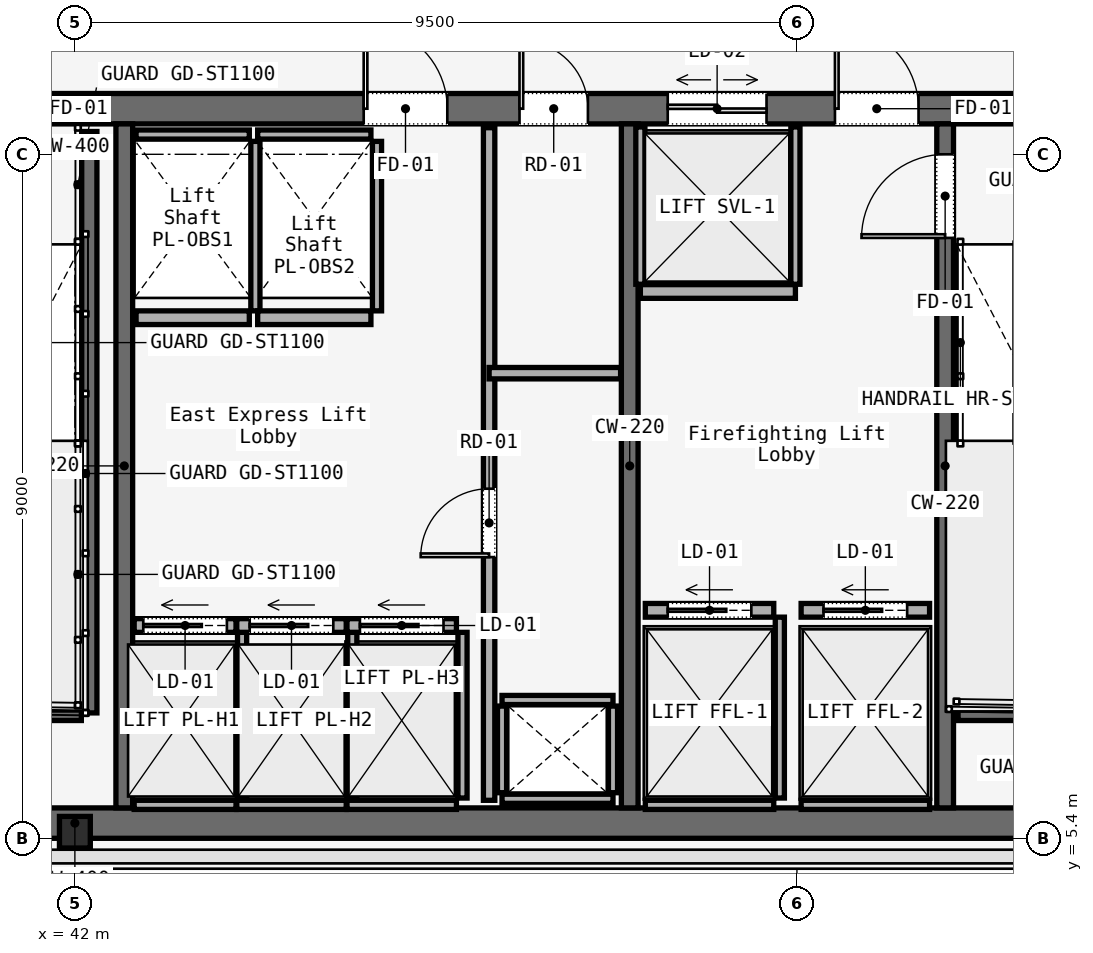
"""IFC4 building model, lengths in metres.
Left out: names, types, materials, properties, quantities, classifications, styles, units other than length and angle.
Written with IfcOpenShell. Run it as: python <this file> out.ifc"""

import sys

from ifc_helpers import new_model, si_unit, direction, frame, frame_2d, origin, origin_2d, place, context, subcontext, project, spatial, rectangle, i_section, extrude, element, fill, save


model = new_model("IFC4")
c1 = context("Model", 3, precision=1e-05, world=origin(), true_north=direction((0.0, 1.0)))
c2 = subcontext(c1, "Body", "Model", "MODEL_VIEW")
j1 = project(units=[si_unit("LENGTHUNIT", "METRE"), si_unit("PLANEANGLEUNIT", "RADIAN")], contexts=[c1])
p1 = place(None, origin())
s1 = spatial("IfcSite", under=j1, at=p1, CompositionType="ELEMENT")
p2 = place(p1, origin())
s2 = spatial("IfcBuilding", under=s1, at=p2, CompositionType="ELEMENT")
p3 = place(p2, frame((0.0, 0.0, 263.6)))
s3 = spatial("IfcBuildingStorey", under=s2, at=p3, CompositionType="ELEMENT", Elevation=263.6)
p4 = place(p3, frame((26.45, 15.0, 0.0), z_axis=(0.0, 0.0, 1.0), x_axis=(1.0, 0.0, 0.0)))
e1 = element("IfcWall", 1, at=p4, inside=s3, PredefinedType="SOLIDWALL", context=c2, shape_type="SweptSolid", body=[
    extrude(rectangle(XDim=31.1, YDim=0.4, at=frame_2d((15.55, 0.0))), origin(), (0.0, 0.0, 1.0), 3.58),
])
p5 = place(p4, frame((1.65, 0.0, 0.0)))
e2 = element("IfcOpeningElement", 2, at=p5, cuts=e1, PredefinedType="OPENING", context=c2, shape_type="SweptSolid", body=[
    extrude(rectangle(XDim=1.1, YDim=2.2, at=frame_2d((0.55, 1.1))), frame((0.0, 0.2, 0.0), z_axis=(0.0, -1.0, 0.0), x_axis=(1.0, 0.0, 0.0)), (0.0, 0.0, 1.0), 0.4),
])
p6 = place(p4, frame((13.65, 0.0, 0.0)))
e3 = element("IfcOpeningElement", 3, at=p6, cuts=e1, PredefinedType="OPENING", context=c2, shape_type="SweptSolid", body=[
    extrude(rectangle(XDim=1.1, YDim=2.2, at=frame_2d((0.55, 1.1))), frame((0.0, 0.2, 0.0), z_axis=(0.0, -1.0, 0.0), x_axis=(1.0, 0.0, 0.0)), (0.0, 0.0, 1.0), 0.4),
])
p7 = place(p4, frame((25.55, 0.0, 0.0)))
e4 = element("IfcOpeningElement", 4, at=p7, cuts=e1, PredefinedType="OPENING", context=c2, shape_type="SweptSolid", body=[
    extrude(rectangle(XDim=1.1, YDim=2.2, at=frame_2d((0.55, 1.1))), frame((0.0, 0.2, 0.0), z_axis=(0.0, -1.0, 0.0), x_axis=(1.0, 0.0, 0.0)), (0.0, 0.0, 1.0), 0.4),
])
p8 = place(p4, frame((19.35, 0.0, 0.0)))
e5 = element("IfcOpeningElement", 5, at=p8, cuts=e1, PredefinedType="OPENING", context=c2, shape_type="SweptSolid", body=[
    extrude(rectangle(XDim=1.1, YDim=2.2, at=frame_2d((0.55, 1.1))), frame((0.0, 0.2, 0.0), z_axis=(0.0, -1.0, 0.0), x_axis=(1.0, 0.0, 0.0)), (0.0, 0.0, 1.0), 0.4),
])
p9 = place(p4, frame((21.4, 0.0, 0.0)))
e6 = element("IfcOpeningElement", 6, at=p9, cuts=e1, PredefinedType="OPENING", context=c2, shape_type="SweptSolid", body=[
    extrude(rectangle(XDim=0.9, YDim=2.1, at=frame_2d((0.45, 1.05))), frame((0.0, 0.2, 0.0), z_axis=(0.0, -1.0, 0.0), x_axis=(1.0, 0.0, 0.0)), (0.0, 0.0, 1.0), 0.4),
])
p10 = place(p4, frame((5.14, 0.0, 0.0)))
e7 = element("IfcOpeningElement", 7, at=p10, cuts=e1, PredefinedType="OPENING", context=c2, shape_type="SweptSolid", body=[
    extrude(rectangle(XDim=0.95, YDim=2.2, at=frame_2d((0.475, 1.1))), frame((0.0, 0.2, 0.0), z_axis=(0.0, -1.0, 0.0), x_axis=(1.0, 0.0, 0.0)), (0.0, 0.0, 1.0), 0.4),
])
p11 = place(p4, frame((7.825, 0.0, 0.0)))
e8 = element("IfcOpeningElement", 8, at=p11, cuts=e1, PredefinedType="OPENING", context=c2, shape_type="SweptSolid", body=[
    extrude(rectangle(XDim=0.95, YDim=2.2, at=frame_2d((0.475, 1.1))), frame((0.0, 0.2, 0.0), z_axis=(0.0, -1.0, 0.0), x_axis=(1.0, 0.0, 0.0)), (0.0, 0.0, 1.0), 0.4),
])
p12 = place(p4, frame((10.46, 0.0, 0.0)))
e9 = element("IfcOpeningElement", 9, at=p12, cuts=e1, PredefinedType="OPENING", context=c2, shape_type="SweptSolid", body=[
    extrude(rectangle(XDim=0.95, YDim=2.2, at=frame_2d((0.475, 1.1))), frame((0.0, 0.2, 0.0), z_axis=(0.0, -1.0, 0.0), x_axis=(1.0, 0.0, 0.0)), (0.0, 0.0, 1.0), 0.4),
])
p13 = place(p4, frame((23.35, 0.0, 0.0)))
e10 = element("IfcOpeningElement", 10, at=p13, cuts=e1, PredefinedType="OPENING", context=c2, shape_type="SweptSolid", body=[
    extrude(rectangle(XDim=1.3, YDim=2.3, at=frame_2d((0.65, 1.15))), frame((0.0, 0.2, 0.0), z_axis=(0.0, -1.0, 0.0), x_axis=(1.0, 0.0, 0.0)), (0.0, 0.0, 1.0), 0.4),
])
p14 = place(p3, frame((26.45, 5.6, 0.0), z_axis=(0.0, 0.0, 1.0), x_axis=(1.0, 0.0, 0.0)))
e11 = element("IfcWall", 11, at=p14, inside=s3, PredefinedType="SOLIDWALL", context=c2, shape_type="SweptSolid", body=[
    extrude(rectangle(XDim=31.1, YDim=0.4, at=frame_2d((15.55, 0.0))), origin(), (0.0, 0.0, 1.0), 3.58),
])
for number, where, z_axis, x_axis in (
    (12, (42.65, 5.8, 0.0), (0.0, 0.0, 1.0), (0.0, 1.0, 0.0)),
    (13, (49.3, 5.8, 0.0), (0.0, 0.0, 1.0), (0.0, 1.0, 0.0)),
):
    element("IfcWall", number, at=place(p3, frame(where, z_axis=z_axis, x_axis=x_axis)), inside=s3, PredefinedType="SOLIDWALL", context=c2, shape_type="SweptSolid", body=[
        extrude(rectangle(XDim=9.0, YDim=0.22, at=frame_2d((4.5, 0.0))), origin(), (0.0, 0.0, 1.0), 3.58),
    ])
p15 = place(p3, frame((53.45, 5.8, 0.0), z_axis=(0.0, 0.0, 1.0), x_axis=(0.0, 1.0, 0.0)))
e14 = element("IfcWall", 14, at=p15, inside=s3, PredefinedType="SOLIDWALL", context=c2, shape_type="SweptSolid", body=[
    extrude(rectangle(XDim=9.0, YDim=0.22, at=frame_2d((4.5, 0.0))), origin(), (0.0, 0.0, 1.0), 3.58),
])
p16 = place(p15, frame((7.5, 0.0, 0.0)))
e15 = element("IfcOpeningElement", 15, at=p16, cuts=e14, PredefinedType="OPENING", context=c2, shape_type="SweptSolid", body=[
    extrude(rectangle(XDim=1.1, YDim=2.2, at=frame_2d((0.55, 1.1))), frame((0.0, 0.11, 0.0), z_axis=(0.0, -1.0, 0.0), x_axis=(1.0, 0.0, 0.0)), (0.0, 0.0, 1.0), 0.22),
])
p17 = place(p3, frame((42.0, 5.48, 0.0), z_axis=(0.0, 0.0, 1.0), x_axis=(1.0, 0.0, 0.0)))
e16 = element("IfcColumn", 16, at=p17, inside=s3, PredefinedType="COLUMN", context=c2, shape_type="SweptSolid", body=[
    extrude(i_section(OverallWidth=0.406, OverallDepth=0.416, WebThickness=0.03, FlangeThickness=0.037, FilletRadius=0.015, at=origin_2d()), origin(), (0.0, 0.0, 1.0), 3.58),
])
p18 = place(p3, frame((42.19, 14.7, 0.0), z_axis=(0.0, 0.0, 1.0), x_axis=(0.0, -1.0, 0.0)))
e17 = element("IfcWall", 17, at=p18, inside=s3, PredefinedType="SOLIDWALL", context=c2, shape_type="SweptSolid", body=[
    extrude(rectangle(XDim=7.65, YDim=0.2, at=frame_2d((3.825, 0.0))), origin(), (0.0, 0.0, 1.0), 3.8),
])
for number, where, z_axis, x_axis in (
    (18, (38.97, 7.05, 0.0), (0.0, 0.0, 1.0), (1.0, 0.0, 0.0)),
    (19, (53.62, 7.05, 0.0), (0.0, 0.0, 1.0), (1.0, 0.0, 0.0)),
):
    element("IfcWall", number, at=place(p3, frame(where, z_axis=z_axis, x_axis=x_axis)), inside=s3, PredefinedType="SOLIDWALL", context=c2, shape_type="SweptSolid", body=[
        extrude(rectangle(XDim=3.115, YDim=0.2, at=frame_2d((1.558, 0.0))), origin(), (0.0, 0.0, 1.0), 3.8),
    ])
for number, where, z_axis, x_axis in (
    (20, (47.62, 5.92, 0.0), (0.0, 0.0, 1.0), (1.0, 0.0, 0.0)),
    (21, (47.62, 7.22, 0.0), (0.0, 0.0, 1.0), (1.0, 0.0, 0.0)),
):
    element("IfcWall", number, at=place(p3, frame(where, z_axis=z_axis, x_axis=x_axis)), inside=s3, PredefinedType="SOLIDWALL", context=c2, shape_type="SweptSolid", body=[
        extrude(rectangle(XDim=1.46, YDim=0.12, at=frame_2d((0.73, 0.0))), origin(), (0.0, 0.0, 1.0), 3.01),
    ])
for number, where, z_axis, x_axis in (
    (22, (47.62, 6.0, 0.0), (0.0, 0.0, 1.0), (0.0, 1.0, 0.0)),
    (23, (49.08, 6.0, 0.0), (0.0, 0.0, 1.0), (0.0, 1.0, 0.0)),
):
    element("IfcWall", number, at=place(p3, frame(where, z_axis=z_axis, x_axis=x_axis)), inside=s3, PredefinedType="SOLIDWALL", context=c2, shape_type="SweptSolid", body=[
        extrude(rectangle(XDim=1.14, YDim=0.12, at=frame_2d((0.57, 0.0))), origin(), (0.0, 0.0, 1.0), 3.01),
    ])
p19 = place(p3, frame((47.45, 5.9, 0.0), z_axis=(0.0, 0.0, 1.0), x_axis=(0.0, 1.0, 0.0)))
e24 = element("IfcWall", 24, at=p19, inside=s3, PredefinedType="PARTITIONING", context=c2, shape_type="SweptSolid", body=[
    extrude(rectangle(XDim=8.85, YDim=0.15, at=frame_2d((4.425, 0.0))), origin(), (0.0, 0.0, 1.0), 3.01),
])
p20 = place(p19, frame((3.2, 0.0, 0.0)))
e25 = element("IfcOpeningElement", 25, at=p20, cuts=e24, PredefinedType="OPENING", context=c2, shape_type="SweptSolid", body=[
    extrude(rectangle(XDim=0.9, YDim=2.1, at=frame_2d((0.45, 1.05))), frame((0.0, 0.075, 0.0), z_axis=(0.0, -1.0, 0.0), x_axis=(1.0, 0.0, 0.0)), (0.0, 0.0, 1.0), 0.15),
])
p21 = place(p3, frame((47.45, 11.52, 0.0), z_axis=(0.0, 0.0, 1.0), x_axis=(1.0, 0.0, 0.0)))
e26 = element("IfcWall", 26, at=p21, inside=s3, PredefinedType="PARTITIONING", context=c2, shape_type="SweptSolid", body=[
    extrude(rectangle(XDim=1.73, YDim=0.15, at=frame_2d((0.865, 0.0))), origin(), (0.0, 0.0, 1.0), 3.01),
])
p22 = place(p3, frame((42.78, 8.2, 0.0), z_axis=(0.0, 0.0, 1.0), x_axis=(1.0, 0.0, 0.0)))
e27 = element("IfcWall", 27, at=p22, inside=s3, PredefinedType="SOLIDWALL", context=c2, shape_type="SweptSolid", body=[
    extrude(rectangle(XDim=1.34, YDim=0.18, at=frame_2d((0.67, 0.0))), origin(), (0.0, 0.0, 1.0), 3.01),
])
p23 = place(p22, frame((0.12, 0.0, 0.0)))
e28 = element("IfcOpeningElement", 28, at=p23, cuts=e27, PredefinedType="OPENING", context=c2, shape_type="SweptSolid", body=[
    extrude(rectangle(XDim=1.1, YDim=2.2, at=frame_2d((0.55, 1.1))), frame((0.0, 0.09, 0.0), z_axis=(0.0, -1.0, 0.0), x_axis=(1.0, 0.0, 0.0)), (0.0, 0.0, 1.0), 0.18),
])
p24 = place(p3, frame((42.78, 5.84, 0.0), z_axis=(0.0, 0.0, 1.0), x_axis=(1.0, 0.0, 0.0)))
e29 = element("IfcWall", 29, at=p24, inside=s3, PredefinedType="SOLIDWALL", context=c2, shape_type="SweptSolid", body=[
    extrude(rectangle(XDim=1.34, YDim=0.12, at=frame_2d((0.67, 0.0))), origin(), (0.0, 0.0, 1.0), 3.01),
])
p25 = place(p3, frame((44.2, 5.93, 0.0), z_axis=(0.0, 0.0, 1.0), x_axis=(0.0, 1.0, 0.0)))
e30 = element("IfcWall", 30, at=p25, inside=s3, PredefinedType="SOLIDWALL", context=c2, shape_type="SweptSolid", body=[
    extrude(rectangle(XDim=2.18, YDim=0.12, at=frame_2d((1.09, 0.0))), origin(), (0.0, 0.0, 1.0), 3.01),
])
p26 = place(p3, frame((44.13, 8.2, 0.0), z_axis=(0.0, 0.0, 1.0), x_axis=(1.0, 0.0, 0.0)))
e31 = element("IfcWall", 31, at=p26, inside=s3, PredefinedType="SOLIDWALL", context=c2, shape_type="SweptSolid", body=[
    extrude(rectangle(XDim=1.44, YDim=0.18, at=frame_2d((0.72, 0.0))), origin(), (0.0, 0.0, 1.0), 3.01),
])
p27 = place(p26, frame((0.17, 0.0, 0.0)))
e32 = element("IfcOpeningElement", 32, at=p27, cuts=e31, PredefinedType="OPENING", context=c2, shape_type="SweptSolid", body=[
    extrude(rectangle(XDim=1.1, YDim=2.2, at=frame_2d((0.55, 1.1))), frame((0.0, 0.09, 0.0), z_axis=(0.0, -1.0, 0.0), x_axis=(1.0, 0.0, 0.0)), (0.0, 0.0, 1.0), 0.18),
])
p28 = place(p3, frame((44.13, 5.84, 0.0), z_axis=(0.0, 0.0, 1.0), x_axis=(1.0, 0.0, 0.0)))
e33 = element("IfcWall", 33, at=p28, inside=s3, PredefinedType="SOLIDWALL", context=c2, shape_type="SweptSolid", body=[
    extrude(rectangle(XDim=1.44, YDim=0.12, at=frame_2d((0.72, 0.0))), origin(), (0.0, 0.0, 1.0), 3.01),
])
p29 = place(p3, frame((45.65, 5.93, 0.0), z_axis=(0.0, 0.0, 1.0), x_axis=(0.0, 1.0, 0.0)))
e34 = element("IfcWall", 34, at=p29, inside=s3, PredefinedType="SOLIDWALL", context=c2, shape_type="SweptSolid", body=[
    extrude(rectangle(XDim=2.18, YDim=0.12, at=frame_2d((1.09, 0.0))), origin(), (0.0, 0.0, 1.0), 3.01),
])
p30 = place(p3, frame((45.58, 8.2, 0.0), z_axis=(0.0, 0.0, 1.0), x_axis=(1.0, 0.0, 0.0)))
e35 = element("IfcWall", 35, at=p30, inside=s3, PredefinedType="SOLIDWALL", context=c2, shape_type="SweptSolid", body=[
    extrude(rectangle(XDim=1.44, YDim=0.18, at=frame_2d((0.72, 0.0))), origin(), (0.0, 0.0, 1.0), 3.01),
])
p31 = place(p30, frame((0.17, 0.0, 0.0)))
e36 = element("IfcOpeningElement", 36, at=p31, cuts=e35, PredefinedType="OPENING", context=c2, shape_type="SweptSolid", body=[
    extrude(rectangle(XDim=1.1, YDim=2.2, at=frame_2d((0.55, 1.1))), frame((0.0, 0.09, 0.0), z_axis=(0.0, -1.0, 0.0), x_axis=(1.0, 0.0, 0.0)), (0.0, 0.0, 1.0), 0.18),
])
p32 = place(p3, frame((45.58, 5.84, 0.0), z_axis=(0.0, 0.0, 1.0), x_axis=(1.0, 0.0, 0.0)))
e37 = element("IfcWall", 37, at=p32, inside=s3, PredefinedType="SOLIDWALL", context=c2, shape_type="SweptSolid", body=[
    extrude(rectangle(XDim=1.44, YDim=0.12, at=frame_2d((0.72, 0.0))), origin(), (0.0, 0.0, 1.0), 3.01),
])
p33 = place(p3, frame((47.1, 5.93, 0.0), z_axis=(0.0, 0.0, 1.0), x_axis=(0.0, 1.0, 0.0)))
e38 = element("IfcWall", 38, at=p33, inside=s3, PredefinedType="SOLIDWALL", context=c2, shape_type="SweptSolid", body=[
    extrude(rectangle(XDim=2.18, YDim=0.12, at=frame_2d((1.09, 0.0))), origin(), (0.0, 0.0, 1.0), 3.01),
])
p34 = place(p3, frame((42.805, 12.25, 0.0), z_axis=(0.0, 0.0, 1.0), x_axis=(1.0, 0.0, 0.0)))
e39 = element("IfcWall", 39, at=p34, inside=s3, PredefinedType="SOLIDWALL", context=c2, shape_type="SweptSolid", body=[
    extrude(rectangle(XDim=1.49, YDim=0.18, at=frame_2d((0.745, 0.0))), origin(), (0.0, 0.0, 1.0), 3.01),
])
p35 = place(p3, frame((42.805, 14.66, 0.0), z_axis=(0.0, 0.0, 1.0), x_axis=(1.0, 0.0, 0.0)))
e40 = element("IfcWall", 40, at=p35, inside=s3, PredefinedType="SOLIDWALL", context=c2, shape_type="SweptSolid", body=[
    extrude(rectangle(XDim=1.49, YDim=0.12, at=frame_2d((0.745, 0.0))), origin(), (0.0, 0.0, 1.0), 3.01),
])
p36 = place(p3, frame((44.375, 12.34, 0.0), z_axis=(0.0, 0.0, 1.0), x_axis=(0.0, 1.0, 0.0)))
e41 = element("IfcWall", 41, at=p36, inside=s3, PredefinedType="SOLIDWALL", context=c2, shape_type="SweptSolid", body=[
    extrude(rectangle(XDim=2.23, YDim=0.12, at=frame_2d((1.115, 0.0))), origin(), (0.0, 0.0, 1.0), 3.01),
])
p37 = place(p3, frame((44.405, 12.25, 0.0), z_axis=(0.0, 0.0, 1.0), x_axis=(1.0, 0.0, 0.0)))
e42 = element("IfcWall", 42, at=p37, inside=s3, PredefinedType="SOLIDWALL", context=c2, shape_type="SweptSolid", body=[
    extrude(rectangle(XDim=1.49, YDim=0.18, at=frame_2d((0.745, 0.0))), origin(), (0.0, 0.0, 1.0), 3.01),
])
p38 = place(p3, frame((44.405, 14.66, 0.0), z_axis=(0.0, 0.0, 1.0), x_axis=(1.0, 0.0, 0.0)))
e43 = element("IfcWall", 43, at=p38, inside=s3, PredefinedType="SOLIDWALL", context=c2, shape_type="SweptSolid", body=[
    extrude(rectangle(XDim=1.49, YDim=0.12, at=frame_2d((0.745, 0.0))), origin(), (0.0, 0.0, 1.0), 3.01),
])
p39 = place(p3, frame((45.975, 12.34, 0.0), z_axis=(0.0, 0.0, 1.0), x_axis=(0.0, 1.0, 0.0)))
e44 = element("IfcWall", 44, at=p39, inside=s3, PredefinedType="SOLIDWALL", context=c2, shape_type="SweptSolid", body=[
    extrude(rectangle(XDim=2.23, YDim=0.12, at=frame_2d((1.115, 0.0))), origin(), (0.0, 0.0, 1.0), 3.01),
])
p40 = place(p3, frame((49.505, 8.4, 0.0), z_axis=(0.0, 0.0, 1.0), x_axis=(1.0, 0.0, 0.0)))
e45 = element("IfcWall", 45, at=p40, inside=s3, PredefinedType="SOLIDWALL", context=c2, shape_type="SweptSolid", body=[
    extrude(rectangle(XDim=1.69, YDim=0.18, at=frame_2d((0.845, 0.0))), origin(), (0.0, 0.0, 1.0), 3.01),
])
p41 = place(p40, frame((0.295, 0.0, 0.0)))
e46 = element("IfcOpeningElement", 46, at=p41, cuts=e45, PredefinedType="OPENING", context=c2, shape_type="SweptSolid", body=[
    extrude(rectangle(XDim=1.1, YDim=2.2, at=frame_2d((0.55, 1.1))), frame((0.0, 0.09, 0.0), z_axis=(0.0, -1.0, 0.0), x_axis=(1.0, 0.0, 0.0)), (0.0, 0.0, 1.0), 0.18),
])
p42 = place(p3, frame((49.505, 5.84, 0.0), z_axis=(0.0, 0.0, 1.0), x_axis=(1.0, 0.0, 0.0)))
e47 = element("IfcWall", 47, at=p42, inside=s3, PredefinedType="SOLIDWALL", context=c2, shape_type="SweptSolid", body=[
    extrude(rectangle(XDim=1.69, YDim=0.12, at=frame_2d((0.845, 0.0))), origin(), (0.0, 0.0, 1.0), 3.01),
])
p43 = place(p3, frame((51.275, 5.93, 0.0), z_axis=(0.0, 0.0, 1.0), x_axis=(0.0, 1.0, 0.0)))
e48 = element("IfcWall", 48, at=p43, inside=s3, PredefinedType="SOLIDWALL", context=c2, shape_type="SweptSolid", body=[
    extrude(rectangle(XDim=2.38, YDim=0.12, at=frame_2d((1.19, 0.0))), origin(), (0.0, 0.0, 1.0), 3.01),
])
p44 = place(p3, frame((51.555, 8.4, 0.0), z_axis=(0.0, 0.0, 1.0), x_axis=(1.0, 0.0, 0.0)))
e49 = element("IfcWall", 49, at=p44, inside=s3, PredefinedType="SOLIDWALL", context=c2, shape_type="SweptSolid", body=[
    extrude(rectangle(XDim=1.69, YDim=0.18, at=frame_2d((0.845, 0.0))), origin(), (0.0, 0.0, 1.0), 3.01),
])
p45 = place(p44, frame((0.295, 0.0, 0.0)))
e50 = element("IfcOpeningElement", 50, at=p45, cuts=e49, PredefinedType="OPENING", context=c2, shape_type="SweptSolid", body=[
    extrude(rectangle(XDim=1.1, YDim=2.2, at=frame_2d((0.55, 1.1))), frame((0.0, 0.09, 0.0), z_axis=(0.0, -1.0, 0.0), x_axis=(1.0, 0.0, 0.0)), (0.0, 0.0, 1.0), 0.18),
])
p46 = place(p3, frame((51.555, 5.84, 0.0), z_axis=(0.0, 0.0, 1.0), x_axis=(1.0, 0.0, 0.0)))
e51 = element("IfcWall", 51, at=p46, inside=s3, PredefinedType="SOLIDWALL", context=c2, shape_type="SweptSolid", body=[
    extrude(rectangle(XDim=1.69, YDim=0.12, at=frame_2d((0.845, 0.0))), origin(), (0.0, 0.0, 1.0), 3.01),
])
p47 = place(p3, frame((49.44, 12.595, 0.0), z_axis=(0.0, 0.0, 1.0), x_axis=(1.0, 0.0, 0.0)))
e52 = element("IfcWall", 52, at=p47, inside=s3, PredefinedType="SOLIDWALL", context=c2, shape_type="SweptSolid", body=[
    extrude(rectangle(XDim=2.04, YDim=0.18, at=frame_2d((1.02, 0.0))), origin(), (0.0, 0.0, 1.0), 3.01),
])
for number, where, z_axis, x_axis in (
    (53, (49.44, 12.69, 0.0), (0.0, 0.0, 1.0), (0.0, 1.0, 0.0)),
    (54, (51.48, 12.69, 0.0), (0.0, 0.0, 1.0), (0.0, 1.0, 0.0)),
):
    element("IfcWall", number, at=place(p3, frame(where, z_axis=z_axis, x_axis=x_axis)), inside=s3, PredefinedType="SOLIDWALL", context=c2, shape_type="SweptSolid", body=[
        extrude(rectangle(XDim=2.07, YDim=0.12, at=frame_2d((1.035, 0.0))), origin(), (0.0, 0.0, 1.0), 3.01),
    ])
p48 = place(p7, origin())
e55 = element("IfcDoor", 55, at=p48, inside=s3, OperationType="SINGLE_SWING_RIGHT", PredefinedType="DOOR", context=c2, shape_type="SweptSolid", body=[
    extrude(rectangle(XDim=1.1, YDim=2.2, at=frame_2d((0.55, 1.1))), frame((0.0, 0.025, 0.0), z_axis=(0.0, -1.0, 0.0), x_axis=(1.0, 0.0, 0.0)), (0.0, 0.0, 1.0), 0.05),
])
fill(e4, e55)
p49 = place(p8, origin())
e56 = element("IfcDoor", 56, at=p49, inside=s3, OperationType="SINGLE_SWING_LEFT", PredefinedType="DOOR", context=c2, shape_type="SweptSolid", body=[
    extrude(rectangle(XDim=1.1, YDim=2.2, at=frame_2d((0.55, 1.1))), frame((0.0, 0.025, 0.0), z_axis=(0.0, -1.0, 0.0), x_axis=(1.0, 0.0, 0.0)), (0.0, 0.0, 1.0), 0.05),
])
fill(e5, e56)
p50 = place(p9, origin())
e57 = element("IfcDoor", 57, at=p50, inside=s3, OperationType="SINGLE_SWING_LEFT", PredefinedType="DOOR", context=c2, shape_type="SweptSolid", body=[
    extrude(rectangle(XDim=0.9, YDim=2.1, at=frame_2d((0.45, 1.05))), frame((0.0, 0.025, 0.0), z_axis=(0.0, -1.0, 0.0), x_axis=(1.0, 0.0, 0.0)), (0.0, 0.0, 1.0), 0.05),
])
fill(e6, e57)
p51 = place(p16, origin())
e58 = element("IfcDoor", 58, at=p51, inside=s3, OperationType="SINGLE_SWING_LEFT", PredefinedType="DOOR", context=c2, shape_type="SweptSolid", body=[
    extrude(rectangle(XDim=1.1, YDim=2.2, at=frame_2d((0.55, 1.1))), frame((0.0, 0.025, 0.0), z_axis=(0.0, -1.0, 0.0), x_axis=(1.0, 0.0, 0.0)), (0.0, 0.0, 1.0), 0.05),
])
fill(e15, e58)
p52 = place(p20, origin())
e59 = element("IfcDoor", 59, at=p52, inside=s3, OperationType="SINGLE_SWING_LEFT", PredefinedType="DOOR", context=c2, shape_type="SweptSolid", body=[
    extrude(rectangle(XDim=0.9, YDim=2.1, at=frame_2d((0.45, 1.05))), frame((0.0, 0.025, 0.0), z_axis=(0.0, -1.0, 0.0), x_axis=(1.0, 0.0, 0.0)), (0.0, 0.0, 1.0), 0.05),
])
fill(e25, e59)
p53 = place(p23, origin())
e60 = element("IfcDoor", 60, at=p53, inside=s3, OperationType="SLIDING_TO_LEFT", PredefinedType="DOOR", context=c2, shape_type="SweptSolid", body=[
    extrude(rectangle(XDim=1.1, YDim=2.2, at=frame_2d((0.55, 1.1))), frame((0.0, 0.025, 0.0), z_axis=(0.0, -1.0, 0.0), x_axis=(1.0, 0.0, 0.0)), (0.0, 0.0, 1.0), 0.05),
])
fill(e28, e60)
p54 = place(p27, origin())
e61 = element("IfcDoor", 61, at=p54, inside=s3, OperationType="SLIDING_TO_LEFT", PredefinedType="DOOR", context=c2, shape_type="SweptSolid", body=[
    extrude(rectangle(XDim=1.1, YDim=2.2, at=frame_2d((0.55, 1.1))), frame((0.0, 0.025, 0.0), z_axis=(0.0, -1.0, 0.0), x_axis=(1.0, 0.0, 0.0)), (0.0, 0.0, 1.0), 0.05),
])
fill(e32, e61)
p55 = place(p31, origin())
e62 = element("IfcDoor", 62, at=p55, inside=s3, OperationType="SLIDING_TO_LEFT", PredefinedType="DOOR", context=c2, shape_type="SweptSolid", body=[
    extrude(rectangle(XDim=1.1, YDim=2.2, at=frame_2d((0.55, 1.1))), frame((0.0, 0.025, 0.0), z_axis=(0.0, -1.0, 0.0), x_axis=(1.0, 0.0, 0.0)), (0.0, 0.0, 1.0), 0.05),
])
fill(e36, e62)
p56 = place(p41, origin())
e63 = element("IfcDoor", 63, at=p56, inside=s3, OperationType="SLIDING_TO_LEFT", PredefinedType="DOOR", context=c2, shape_type="SweptSolid", body=[
    extrude(rectangle(XDim=1.1, YDim=2.2, at=frame_2d((0.55, 1.1))), frame((0.0, 0.025, 0.0), z_axis=(0.0, -1.0, 0.0), x_axis=(1.0, 0.0, 0.0)), (0.0, 0.0, 1.0), 0.05),
])
fill(e46, e63)
p57 = place(p45, origin())
e64 = element("IfcDoor", 64, at=p57, inside=s3, OperationType="SLIDING_TO_LEFT", PredefinedType="DOOR", context=c2, shape_type="SweptSolid", body=[
    extrude(rectangle(XDim=1.1, YDim=2.2, at=frame_2d((0.55, 1.1))), frame((0.0, 0.025, 0.0), z_axis=(0.0, -1.0, 0.0), x_axis=(1.0, 0.0, 0.0)), (0.0, 0.0, 1.0), 0.05),
])
fill(e50, e64)
p58 = place(p13, origin())
e65 = element("IfcDoor", 65, at=p58, inside=s3, OperationType="DOUBLE_DOOR_SLIDING", PredefinedType="DOOR", context=c2, shape_type="SweptSolid", body=[
    extrude(rectangle(XDim=1.3, YDim=2.3, at=frame_2d((0.65, 1.15))), frame((0.0, 0.025, 0.0), z_axis=(0.0, -1.0, 0.0), x_axis=(1.0, 0.0, 0.0)), (0.0, 0.0, 1.0), 0.05),
])
fill(e10, e65)
save(model, sys.argv[1])
